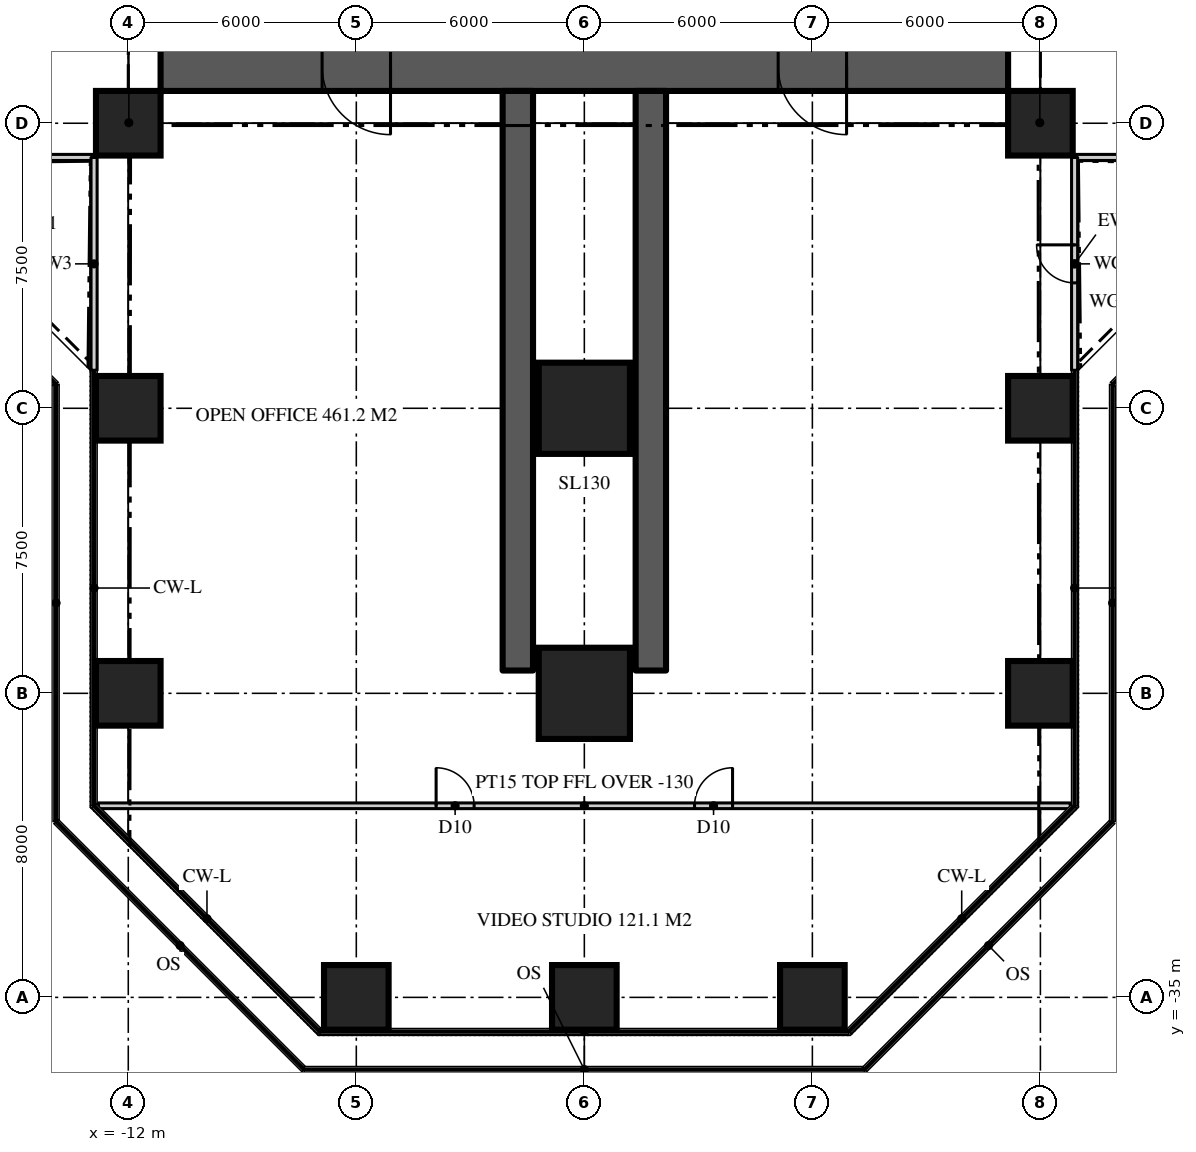
"""IFC4 building model, lengths in metres.
Left out: names, types, materials, properties, quantities, classifications, styles, units other than length and angle.
Written with IfcOpenShell. Run it as: python <this file> out.ifc"""

import sys

from ifc_helpers import new_model, si_unit, direction, frame, frame_2d, origin, origin_2d, place, context, subcontext, project, spatial, rectangle, extrude, element, fill, save


model = new_model("IFC4")
c1 = context("Model", 3, precision=1e-05, world=origin(), true_north=direction((0.0, 1.0)))
c2 = subcontext(c1, "Body", "Model", "MODEL_VIEW")
j1 = project(units=[si_unit("LENGTHUNIT", "METRE"), si_unit("PLANEANGLEUNIT", "RADIAN")], contexts=[c1])
p1 = place(None, origin())
s1 = spatial("IfcSite", under=j1, at=p1, CompositionType="ELEMENT")
p2 = place(p1, origin())
s2 = spatial("IfcBuilding", under=s1, at=p2, CompositionType="ELEMENT")
p3 = place(p2, frame((0.0, 0.0, 66.9)))
s3 = spatial("IfcBuildingStorey", under=s2, at=p3, CompositionType="ELEMENT", Elevation=66.9)
p4 = place(p3, frame((11.15, -10.5, 0.0), z_axis=(0.0, 0.0, 1.0), x_axis=(-1.0, 0.0, 0.0)))
e1 = element("IfcWall", 1, at=p4, inside=s3, PredefinedType="SHEAR", context=c2, shape_type="SweptSolid", body=[
    extrude(rectangle(XDim=22.3, YDim=1.3, at=frame_2d((11.15, 0.0))), origin(), (0.0, 0.0, 1.0), 3.9),
])
p5 = place(p4, frame((16.25, 0.0, 0.0)))
e2 = element("IfcOpeningElement", 2, at=p5, cuts=e1, PredefinedType="OPENING", context=c2, shape_type="SweptSolid", body=[
    extrude(rectangle(XDim=1.8, YDim=2.2, at=frame_2d((0.9, 1.1))), frame((0.0, 0.66, 0.0), z_axis=(0.0, -1.0, 0.0), x_axis=(1.0, 0.0, 0.0)), (0.0, 0.0, 1.0), 1.32),
])
p6 = place(p4, frame((4.25, 0.0, 0.0)))
e3 = element("IfcOpeningElement", 3, at=p6, cuts=e1, PredefinedType="OPENING", context=c2, shape_type="SweptSolid", body=[
    extrude(rectangle(XDim=1.8, YDim=2.2, at=frame_2d((0.9, 1.1))), frame((0.0, 0.66, 0.0), z_axis=(0.0, -1.0, 0.0), x_axis=(1.0, 0.0, 0.0)), (0.0, 0.0, 1.0), 1.32),
])
for number, where, z_axis, x_axis in (
    (4, (-1.75, -11.15, 0.0), (0.0, 0.0, 1.0), (0.0, -1.0, 0.0)),
    (5, (1.75, -11.15, 0.0), (0.0, 0.0, 1.0), (0.0, -1.0, 0.0)),
):
    element("IfcWall", number, at=place(p3, frame(where, z_axis=z_axis, x_axis=x_axis)), inside=s3, PredefinedType="SHEAR", context=c2, shape_type="SweptSolid", body=[
        extrude(rectangle(XDim=15.25, YDim=0.8, at=frame_2d((7.625, 0.0))), origin(), (0.0, 0.0, 1.0), 3.9),
    ])
for number, where, z_axis, x_axis in (
    (6, (-6.0, -35.0, 0.0), (0.0, 0.0, 1.0), (1.0, 0.0, 0.0)),
    (7, (0.0, -35.0, 0.0), (0.0, 0.0, 1.0), (1.0, 0.0, 0.0)),
    (8, (6.0, -35.0, 0.0), (0.0, 0.0, 1.0), (1.0, 0.0, 0.0)),
    (9, (-12.0, -27.0, 0.0), (0.0, 0.0, 1.0), (1.0, 0.0, 0.0)),
):
    element("IfcColumn", number, at=place(p3, frame(where, z_axis=z_axis, x_axis=x_axis)), inside=s3, PredefinedType="COLUMN", context=c2, shape_type="SweptSolid", body=[
        extrude(rectangle(XDim=1.7, YDim=1.7, at=origin_2d()), origin(), (0.0, 0.0, 1.0), 3.9),
    ])
p7 = place(p3, frame((0.0, -27.0, 0.0), z_axis=(0.0, 0.0, 1.0), x_axis=(1.0, 0.0, 0.0)))
e10 = element("IfcColumn", 10, at=p7, inside=s3, PredefinedType="COLUMN", context=c2, shape_type="SweptSolid", body=[
    extrude(rectangle(XDim=2.4, YDim=2.4, at=origin_2d()), origin(), (0.0, 0.0, 1.0), 3.9),
])
for number, where, z_axis, x_axis in (
    (11, (12.0, -27.0, 0.0), (0.0, 0.0, 1.0), (1.0, 0.0, 0.0)),
    (12, (-12.0, -19.5, 0.0), (0.0, 0.0, 1.0), (1.0, 0.0, 0.0)),
):
    element("IfcColumn", number, at=place(p3, frame(where, z_axis=z_axis, x_axis=x_axis)), inside=s3, PredefinedType="COLUMN", context=c2, shape_type="SweptSolid", body=[
        extrude(rectangle(XDim=1.7, YDim=1.7, at=origin_2d()), origin(), (0.0, 0.0, 1.0), 3.9),
    ])
p8 = place(p3, frame((0.0, -19.5, 0.0), z_axis=(0.0, 0.0, 1.0), x_axis=(1.0, 0.0, 0.0)))
e13 = element("IfcColumn", 13, at=p8, inside=s3, PredefinedType="COLUMN", context=c2, shape_type="SweptSolid", body=[
    extrude(rectangle(XDim=2.4, YDim=2.4, at=origin_2d()), origin(), (0.0, 0.0, 1.0), 3.9),
])
for number, where, z_axis, x_axis in (
    (14, (12.0, -19.5, 0.0), (0.0, 0.0, 1.0), (1.0, 0.0, 0.0)),
    (15, (-12.0, -12.0, 0.0), (0.0, 0.0, 1.0), (1.0, 0.0, 0.0)),
    (16, (12.0, -12.0, 0.0), (0.0, 0.0, 1.0), (1.0, 0.0, 0.0)),
):
    element("IfcColumn", number, at=place(p3, frame(where, z_axis=z_axis, x_axis=x_axis)), inside=s3, PredefinedType="COLUMN", context=c2, shape_type="SweptSolid", body=[
        extrude(rectangle(XDim=1.7, YDim=1.7, at=origin_2d()), origin(), (0.0, 0.0, 1.0), 3.9),
    ])
p9 = place(p3, frame((12.9, -12.9, 0.0), z_axis=(0.0, 0.0, 1.0), x_axis=(1.0, 0.0, 0.0)))
e17 = element("IfcWall", 17, at=p9, inside=s3, PredefinedType="SOLIDWALL", context=c2, shape_type="SweptSolid", body=[
    extrude(rectangle(XDim=5.6, YDim=0.16, at=frame_2d((2.8, 0.0))), origin(), (0.0, 0.0, 1.0), 3.77),
])
p10 = place(p3, frame((-18.5, -12.9, 0.0), z_axis=(0.0, 0.0, 1.0), x_axis=(1.0, 0.0, 0.0)))
e18 = element("IfcWall", 18, at=p10, inside=s3, PredefinedType="SOLIDWALL", context=c2, shape_type="SweptSolid", body=[
    extrude(rectangle(XDim=5.6, YDim=0.16, at=frame_2d((2.8, 0.0))), origin(), (0.0, 0.0, 1.0), 3.77),
])
p11 = place(p10, frame((2.3, 0.0, 0.0)))
e19 = element("IfcOpeningElement", 19, at=p11, cuts=e18, PredefinedType="OPENING", context=c2, shape_type="SweptSolid", body=[
    extrude(rectangle(XDim=1.0, YDim=2.2, at=frame_2d((0.5, 1.1))), frame((0.0, 0.09, 0.0), z_axis=(0.0, -1.0, 0.0), x_axis=(1.0, 0.0, 0.0)), (0.0, 0.0, 1.0), 0.18),
])
p12 = place(p3, frame((-12.9, -12.9, 0.0), z_axis=(0.0, 0.0, 1.0), x_axis=(0.0, -1.0, 0.0)))
e20 = element("IfcWall", 20, at=p12, inside=s3, PredefinedType="SOLIDWALL", context=c2, shape_type="SweptSolid", body=[
    extrude(rectangle(XDim=5.6, YDim=0.16, at=frame_2d((2.8, 0.0))), origin(), (0.0, 0.0, 1.0), 3.77),
])
p13 = place(p3, frame((12.9, -18.5, 0.0), z_axis=(0.0, 0.0, 1.0), x_axis=(0.0, 1.0, 0.0)))
e21 = element("IfcWall", 21, at=p13, inside=s3, PredefinedType="SOLIDWALL", context=c2, shape_type="SweptSolid", body=[
    extrude(rectangle(XDim=5.6, YDim=0.16, at=frame_2d((2.8, 0.0))), origin(), (0.0, 0.0, 1.0), 3.77),
])
p14 = place(p13, frame((2.3, 0.0, 0.0)))
e22 = element("IfcOpeningElement", 22, at=p14, cuts=e21, PredefinedType="OPENING", context=c2, shape_type="SweptSolid", body=[
    extrude(rectangle(XDim=1.0, YDim=2.2, at=frame_2d((0.5, 1.1))), frame((0.0, 0.09, 0.0), z_axis=(0.0, -1.0, 0.0), x_axis=(1.0, 0.0, 0.0)), (0.0, 0.0, 1.0), 0.18),
])
p15 = place(p3, frame((-12.786, -29.959, 0.0), z_axis=(0.0, 0.0, 1.0), x_axis=(1.0, 0.0, 0.0)))
e23 = element("IfcWall", 23, at=p15, inside=s3, PredefinedType="PARTITIONING", context=c2, shape_type="SweptSolid", body=[
    extrude(rectangle(XDim=25.573, YDim=0.15, at=frame_2d((12.786, 0.0))), origin(), (0.0, 0.0, 1.0), 3.77),
])
p16 = place(p15, frame((15.687, 0.0, 0.0)))
e24 = element("IfcOpeningElement", 24, at=p16, cuts=e23, PredefinedType="OPENING", context=c2, shape_type="SweptSolid", body=[
    extrude(rectangle(XDim=1.0, YDim=2.2, at=frame_2d((0.5, 1.1))), frame((0.0, 0.085, 0.0), z_axis=(0.0, -1.0, 0.0), x_axis=(1.0, 0.0, 0.0)), (0.0, 0.0, 1.0), 0.17),
])
p17 = place(p15, frame((8.886, 0.0, 0.0)))
e25 = element("IfcOpeningElement", 25, at=p17, cuts=e23, PredefinedType="OPENING", context=c2, shape_type="SweptSolid", body=[
    extrude(rectangle(XDim=1.0, YDim=2.2, at=frame_2d((0.5, 1.1))), frame((0.0, 0.085, 0.0), z_axis=(0.0, -1.0, 0.0), x_axis=(1.0, 0.0, 0.0)), (0.0, 0.0, 1.0), 0.17),
])
for number, where, z_axis, x_axis in (
    (26, (-11.15, -11.15, 0.0), (0.0, 0.0, 1.0), (-0.707, -0.707, 0.0)),
    (27, (11.15, -11.15, 0.0), (0.0, 0.0, 1.0), (0.707, -0.707, 0.0)),
):
    element("IfcWall", number, at=place(p3, frame(where, z_axis=z_axis, x_axis=x_axis)), inside=s3, PredefinedType="PARTITIONING", context=c2, shape_type="SweptSolid", body=[
        extrude(rectangle(XDim=2.362, YDim=0.15, at=frame_2d((1.181, 0.0))), origin(), (0.0, 0.0, 1.0), 3.22),
    ])
p18 = place(p14, origin())
e28 = element("IfcDoor", 28, at=p18, inside=s3, OperationType="SINGLE_SWING_RIGHT", PredefinedType="DOOR", context=c2, shape_type="SweptSolid", body=[
    extrude(rectangle(XDim=1.0, YDim=2.2, at=frame_2d((0.5, 1.1))), frame((0.0, 0.025, 0.0), z_axis=(0.0, -1.0, 0.0), x_axis=(1.0, 0.0, 0.0)), (0.0, 0.0, 1.0), 0.05),
])
fill(e22, e28)
p19 = place(p5, origin())
e29 = element("IfcDoor", 29, at=p19, inside=s3, OperationType="DOUBLE_DOOR_DOUBLE_SWING", PredefinedType="DOOR", context=c2, shape_type="SweptSolid", body=[
    extrude(rectangle(XDim=1.8, YDim=2.2, at=frame_2d((0.9, 1.1))), frame((0.0, 0.025, 0.0), z_axis=(0.0, -1.0, 0.0), x_axis=(1.0, 0.0, 0.0)), (0.0, 0.0, 1.0), 0.05),
])
fill(e2, e29)
p20 = place(p6, origin())
e30 = element("IfcDoor", 30, at=p20, inside=s3, OperationType="DOUBLE_DOOR_DOUBLE_SWING", PredefinedType="DOOR", context=c2, shape_type="SweptSolid", body=[
    extrude(rectangle(XDim=1.8, YDim=2.2, at=frame_2d((0.9, 1.1))), frame((0.0, 0.025, 0.0), z_axis=(0.0, -1.0, 0.0), x_axis=(1.0, 0.0, 0.0)), (0.0, 0.0, 1.0), 0.05),
])
fill(e3, e30)
p21 = place(p16, origin())
e31 = element("IfcDoor", 31, at=p21, inside=s3, OperationType="SINGLE_SWING_RIGHT", PredefinedType="DOOR", context=c2, shape_type="SweptSolid", body=[
    extrude(rectangle(XDim=1.0, YDim=2.2, at=frame_2d((0.5, 1.1))), frame((0.0, 0.025, 0.0), z_axis=(0.0, -1.0, 0.0), x_axis=(1.0, 0.0, 0.0)), (0.0, 0.0, 1.0), 0.05),
])
fill(e24, e31)
p22 = place(p17, origin())
e32 = element("IfcDoor", 32, at=p22, inside=s3, OperationType="SINGLE_SWING_LEFT", PredefinedType="DOOR", context=c2, shape_type="SweptSolid", body=[
    extrude(rectangle(XDim=1.0, YDim=2.2, at=frame_2d((0.5, 1.1))), frame((0.0, 0.025, 0.0), z_axis=(0.0, -1.0, 0.0), x_axis=(1.0, 0.0, 0.0)), (0.0, 0.0, 1.0), 0.05),
])
fill(e25, e32)
save(model, sys.argv[1])
